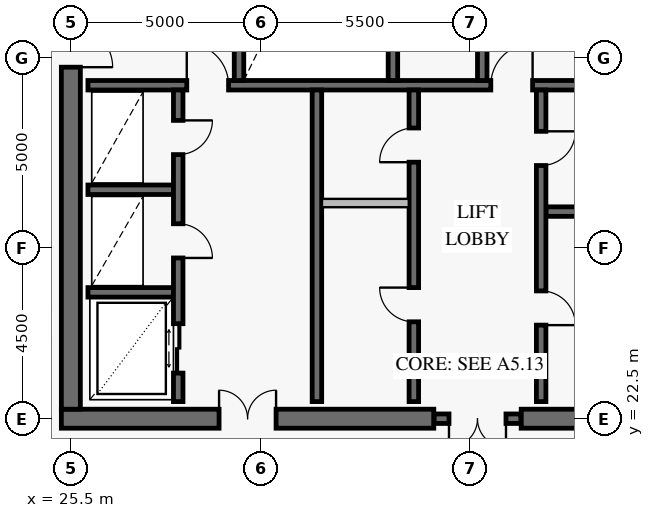
"""IFC4 building model, lengths in metres.
Left out: names, types, materials, properties, quantities, classifications, styles, units other than length and angle.
Written with IfcOpenShell. Run it as: python <this file> out.ifc"""

import sys

from ifc_helpers import new_model, si_unit, direction, frame, frame_2d, origin, place, context, subcontext, project, spatial, rectangle, extrude, element, fill, save


model = new_model("IFC4")
c1 = context("Model", 3, precision=1e-05, world=origin(), true_north=direction((0.0, 1.0)))
c2 = subcontext(c1, "Body", "Model", "MODEL_VIEW")
j1 = project(units=[si_unit("LENGTHUNIT", "METRE"), si_unit("PLANEANGLEUNIT", "RADIAN")], contexts=[c1])
p1 = place(None, origin())
s1 = spatial("IfcSite", under=j1, at=p1, CompositionType="ELEMENT")
p2 = place(p1, origin())
s2 = spatial("IfcBuilding", under=s1, at=p2, CompositionType="ELEMENT")
p3 = place(p2, frame((0.0, 0.0, 342.4)))
s3 = spatial("IfcBuildingStorey", under=s2, at=p3, CompositionType="ELEMENT", Elevation=342.4)
p4 = place(p3, frame((25.25, 22.5, 0.0), z_axis=(0.0, 0.0, 1.0), x_axis=(1.0, 0.0, 0.0)))
e1 = element("IfcWall", 1, at=p4, inside=s3, PredefinedType="SHEAR", context=c2, shape_type="SweptSolid", body=[
    extrude(rectangle(XDim=9.8, YDim=0.5, at=frame_2d((4.9, 0.0))), origin(), (0.0, 0.0, 1.0), 3.8),
])
p5 = place(p4, frame((4.15, 0.0, 0.0)))
e2 = element("IfcOpeningElement", 2, at=p5, cuts=e1, PredefinedType="OPENING", context=c2, shape_type="SweptSolid", body=[
    extrude(rectangle(XDim=1.5, YDim=2.15, at=frame_2d((0.75, 1.075))), frame((0.0, 0.262, 0.0), z_axis=(0.0, -1.0, 0.0), x_axis=(1.0, 0.0, 0.0)), (0.0, 0.0, 1.0), 0.524),
])
p6 = place(p3, frame((37.35, 22.5, 0.0), z_axis=(0.0, 0.0, 1.0), x_axis=(1.0, 0.0, 0.0)))
e3 = element("IfcWall", 3, at=p6, inside=s3, PredefinedType="SHEAR", context=c2, shape_type="SweptSolid", body=[
    extrude(rectangle(XDim=9.4, YDim=0.5, at=frame_2d((4.7, 0.0))), origin(), (0.0, 0.0, 1.0), 3.8),
])
p7 = place(p6, frame((3.95, 0.0, 0.0)))
e4 = element("IfcOpeningElement", 4, at=p7, cuts=e3, PredefinedType="OPENING", context=c2, shape_type="SweptSolid", body=[
    extrude(rectangle(XDim=1.5, YDim=2.15, at=frame_2d((0.75, 1.075))), frame((0.0, 0.262, 0.0), z_axis=(0.0, -1.0, 0.0), x_axis=(1.0, 0.0, 0.0)), (0.0, 0.0, 1.0), 0.524),
])
p8 = place(p3, frame((25.5, 22.75, 0.0), z_axis=(0.0, 0.0, 1.0), x_axis=(0.0, 1.0, 0.0)))
e5 = element("IfcWall", 5, at=p8, inside=s3, PredefinedType="SHEAR", context=c2, shape_type="SweptSolid", body=[
    extrude(rectangle(XDim=18.5, YDim=0.5, at=frame_2d((9.25, 0.0))), origin(), (0.0, 0.0, 1.0), 3.8),
])
p9 = place(p8, frame((9.0, 0.0, 0.0)))
e6 = element("IfcOpeningElement", 6, at=p9, cuts=e5, PredefinedType="OPENING", context=c2, shape_type="SweptSolid", body=[
    extrude(rectangle(XDim=1.1, YDim=2.15, at=frame_2d((0.55, 1.075))), frame((0.0, 0.262, 0.0), z_axis=(0.0, -1.0, 0.0), x_axis=(1.0, 0.0, 0.0)), (0.0, 0.0, 1.0), 0.524),
])
p10 = place(p3, frame((35.06, 22.5, 0.0), z_axis=(0.0, 0.0, 1.0), x_axis=(1.0, 0.0, 0.0)))
e7 = element("IfcWall", 7, at=p10, inside=s3, PredefinedType="SOLIDWALL", context=c2, shape_type="SweptSolid", body=[
    extrude(rectangle(XDim=2.28, YDim=0.25, at=frame_2d((1.14, 0.0))), origin(), (0.0, 0.0, 1.0), 3.8),
])
p11 = place(p10, frame((0.39, 0.0, 0.0)))
e8 = element("IfcOpeningElement", 8, at=p11, cuts=e7, PredefinedType="OPENING", context=c2, shape_type="SweptSolid", body=[
    extrude(rectangle(XDim=1.5, YDim=2.15, at=frame_2d((0.75, 1.075))), frame((0.0, 0.137, 0.0), z_axis=(0.0, -1.0, 0.0), x_axis=(1.0, 0.0, 0.0)), (0.0, 0.0, 1.0), 0.274),
])
p12 = place(p3, frame((25.95, 31.275, 0.0), z_axis=(0.0, 0.0, 1.0), x_axis=(1.0, 0.0, 0.0)))
e9 = element("IfcWall", 9, at=p12, inside=s3, PredefinedType="SOLIDWALL", context=c2, shape_type="SweptSolid", body=[
    extrude(rectangle(XDim=20.1, YDim=0.25, at=frame_2d((10.05, 0.0))), origin(), (0.0, 0.0, 1.0), 3.8),
])
p13 = place(p12, frame((2.6, 0.0, 0.0)))
e10 = element("IfcOpeningElement", 10, at=p13, cuts=e9, PredefinedType="OPENING", context=c2, shape_type="SweptSolid", body=[
    extrude(rectangle(XDim=1.1, YDim=2.15, at=frame_2d((0.55, 1.075))), frame((0.0, 0.137, 0.0), z_axis=(0.0, -1.0, 0.0), x_axis=(1.0, 0.0, 0.0)), (0.0, 0.0, 1.0), 0.274),
])
p14 = place(p12, frame((10.6, 0.0, 0.0)))
e11 = element("IfcOpeningElement", 11, at=p14, cuts=e9, PredefinedType="OPENING", context=c2, shape_type="SweptSolid", body=[
    extrude(rectangle(XDim=1.1, YDim=2.15, at=frame_2d((0.55, 1.075))), frame((0.0, 0.137, 0.0), z_axis=(0.0, -1.0, 0.0), x_axis=(1.0, 0.0, 0.0)), (0.0, 0.0, 1.0), 0.274),
])
p15 = place(p12, frame((16.35, 0.0, 0.0)))
e12 = element("IfcOpeningElement", 12, at=p15, cuts=e9, PredefinedType="OPENING", context=c2, shape_type="SweptSolid", body=[
    extrude(rectangle(XDim=1.1, YDim=2.15, at=frame_2d((0.55, 1.075))), frame((0.0, 0.137, 0.0), z_axis=(0.0, -1.0, 0.0), x_axis=(1.0, 0.0, 0.0)), (0.0, 0.0, 1.0), 0.274),
])
for number, where, z_axis, x_axis in (
    (13, (29.925, 31.4, 0.0), (0.0, 0.0, 1.0), (0.0, 1.0, 0.0)),
    (14, (33.975, 31.4, 0.0), (0.0, 0.0, 1.0), (0.0, 1.0, 0.0)),
):
    element("IfcWall", number, at=place(p3, frame(where, z_axis=z_axis, x_axis=x_axis)), inside=s3, PredefinedType="SOLIDWALL", context=c2, shape_type="SweptSolid", body=[
        extrude(rectangle(XDim=9.7, YDim=0.25, at=frame_2d((4.85, 0.0))), origin(), (0.0, 0.0, 1.0), 3.8),
    ])
p16 = place(p3, frame((36.325, 31.4, 0.0), z_axis=(0.0, 0.0, 1.0), x_axis=(0.0, 1.0, 0.0)))
e15 = element("IfcWall", 15, at=p16, inside=s3, PredefinedType="SOLIDWALL", context=c2, shape_type="SweptSolid", body=[
    extrude(rectangle(XDim=9.65, YDim=0.25, at=frame_2d((4.825, 0.0))), origin(), (0.0, 0.0, 1.0), 3.8),
])
p17 = place(p16, frame((0.84, 0.0, 0.0)))
e16 = element("IfcOpeningElement", 16, at=p17, cuts=e15, PredefinedType="OPENING", context=c2, shape_type="SweptSolid", body=[
    extrude(rectangle(XDim=0.9, YDim=2.1, at=frame_2d((0.45, 1.05))), frame((0.0, 0.137, 0.0), z_axis=(0.0, -1.0, 0.0), x_axis=(1.0, 0.0, 0.0)), (0.0, 0.0, 1.0), 0.274),
])
p18 = place(p16, frame((4.1, 0.0, 0.0)))
e17 = element("IfcOpeningElement", 17, at=p18, cuts=e15, PredefinedType="OPENING", context=c2, shape_type="SweptSolid", body=[
    extrude(rectangle(XDim=0.9, YDim=2.1, at=frame_2d((0.45, 1.05))), frame((0.0, 0.137, 0.0), z_axis=(0.0, -1.0, 0.0), x_axis=(1.0, 0.0, 0.0)), (0.0, 0.0, 1.0), 0.274),
])
p19 = place(p16, frame((7.61, 0.0, 0.0)))
e18 = element("IfcOpeningElement", 18, at=p19, cuts=e15, PredefinedType="OPENING", context=c2, shape_type="SweptSolid", body=[
    extrude(rectangle(XDim=0.9, YDim=2.1, at=frame_2d((0.45, 1.05))), frame((0.0, 0.137, 0.0), z_axis=(0.0, -1.0, 0.0), x_axis=(1.0, 0.0, 0.0)), (0.0, 0.0, 1.0), 0.274),
])
for number, where, z_axis, x_axis in (
    (19, (25.95, 25.825, 0.0), (0.0, 0.0, 1.0), (1.0, 0.0, 0.0)),
    (20, (25.95, 28.525, 0.0), (0.0, 0.0, 1.0), (1.0, 0.0, 0.0)),
):
    element("IfcWall", number, at=place(p3, frame(where, z_axis=z_axis, x_axis=x_axis)), inside=s3, PredefinedType="SOLIDWALL", context=c2, shape_type="SweptSolid", body=[
        extrude(rectangle(XDim=2.25, YDim=0.25, at=frame_2d((1.125, 0.0))), origin(), (0.0, 0.0, 1.0), 3.8),
    ])
p20 = place(p3, frame((28.325, 22.95, 0.0), z_axis=(0.0, 0.0, 1.0), x_axis=(0.0, 1.0, 0.0)))
e21 = element("IfcWall", 21, at=p20, inside=s3, PredefinedType="SOLIDWALL", context=c2, shape_type="SweptSolid", body=[
    extrude(rectangle(XDim=8.2, YDim=0.25, at=frame_2d((4.1, 0.0))), origin(), (0.0, 0.0, 1.0), 3.8),
])
p21 = place(p20, frame((0.75, 0.0, 0.0)))
e22 = element("IfcOpeningElement", 22, at=p21, cuts=e21, PredefinedType="OPENING", context=c2, shape_type="SweptSolid", body=[
    extrude(rectangle(XDim=1.3, YDim=2.3, at=frame_2d((0.65, 1.15))), frame((0.0, 0.137, 0.0), z_axis=(0.0, -1.0, 0.0), x_axis=(1.0, 0.0, 0.0)), (0.0, 0.0, 1.0), 0.274),
])
p22 = place(p20, frame((3.78, 0.0, 0.0)))
e23 = element("IfcOpeningElement", 23, at=p22, cuts=e21, PredefinedType="OPENING", context=c2, shape_type="SweptSolid", body=[
    extrude(rectangle(XDim=0.9, YDim=2.1, at=frame_2d((0.45, 1.05))), frame((0.0, 0.137, 0.0), z_axis=(0.0, -1.0, 0.0), x_axis=(1.0, 0.0, 0.0)), (0.0, 0.0, 1.0), 0.274),
])
p23 = place(p20, frame((6.5, 0.0, 0.0)))
e24 = element("IfcOpeningElement", 24, at=p23, cuts=e21, PredefinedType="OPENING", context=c2, shape_type="SweptSolid", body=[
    extrude(rectangle(XDim=0.9, YDim=2.1, at=frame_2d((0.45, 1.05))), frame((0.0, 0.137, 0.0), z_axis=(0.0, -1.0, 0.0), x_axis=(1.0, 0.0, 0.0)), (0.0, 0.0, 1.0), 0.274),
])
p24 = place(p3, frame((31.975, 22.95, 0.0), z_axis=(0.0, 0.0, 1.0), x_axis=(0.0, 1.0, 0.0)))
e25 = element("IfcWall", 25, at=p24, inside=s3, PredefinedType="SOLIDWALL", context=c2, shape_type="SweptSolid", body=[
    extrude(rectangle(XDim=8.2, YDim=0.25, at=frame_2d((4.1, 0.0))), origin(), (0.0, 0.0, 1.0), 3.8),
])
p25 = place(p3, frame((34.525, 22.95, 0.0), z_axis=(0.0, 0.0, 1.0), x_axis=(0.0, 1.0, 0.0)))
e26 = element("IfcWall", 26, at=p25, inside=s3, PredefinedType="SOLIDWALL", context=c2, shape_type="SweptSolid", body=[
    extrude(rectangle(XDim=8.2, YDim=0.25, at=frame_2d((4.1, 0.0))), origin(), (0.0, 0.0, 1.0), 3.8),
])
p26 = place(p25, frame((2.1, 0.0, 0.0)))
e27 = element("IfcOpeningElement", 27, at=p26, cuts=e26, PredefinedType="OPENING", context=c2, shape_type="SweptSolid", body=[
    extrude(rectangle(XDim=0.9, YDim=2.1, at=frame_2d((0.45, 1.05))), frame((0.0, 0.137, 0.0), z_axis=(0.0, -1.0, 0.0), x_axis=(1.0, 0.0, 0.0)), (0.0, 0.0, 1.0), 0.274),
])
p27 = place(p25, frame((6.3, 0.0, 0.0)))
e28 = element("IfcOpeningElement", 28, at=p27, cuts=e26, PredefinedType="OPENING", context=c2, shape_type="SweptSolid", body=[
    extrude(rectangle(XDim=0.9, YDim=2.1, at=frame_2d((0.45, 1.05))), frame((0.0, 0.137, 0.0), z_axis=(0.0, -1.0, 0.0), x_axis=(1.0, 0.0, 0.0)), (0.0, 0.0, 1.0), 0.274),
])
p28 = place(p3, frame((38.0, 27.95, 0.0), z_axis=(0.0, 0.0, 1.0), x_axis=(1.0, 0.0, 0.0)))
e29 = element("IfcWall", 29, at=p28, inside=s3, PredefinedType="SOLIDWALL", context=c2, shape_type="SweptSolid", body=[
    extrude(rectangle(XDim=2.3, YDim=0.25, at=frame_2d((1.15, 0.0))), origin(), (0.0, 0.0, 1.0), 3.8),
])
p29 = place(p3, frame((37.875, 22.95, 0.0), z_axis=(0.0, 0.0, 1.0), x_axis=(0.0, 1.0, 0.0)))
e30 = element("IfcWall", 30, at=p29, inside=s3, PredefinedType="SOLIDWALL", context=c2, shape_type="SweptSolid", body=[
    extrude(rectangle(XDim=8.2, YDim=0.25, at=frame_2d((4.1, 0.0))), origin(), (0.0, 0.0, 1.0), 3.8),
])
p30 = place(p29, frame((2.012, 0.0, 0.0)))
e31 = element("IfcOpeningElement", 31, at=p30, cuts=e30, PredefinedType="OPENING", context=c2, shape_type="SweptSolid", body=[
    extrude(rectangle(XDim=0.9, YDim=2.1, at=frame_2d((0.45, 1.05))), frame((0.0, 0.137, 0.0), z_axis=(0.0, -1.0, 0.0), x_axis=(1.0, 0.0, 0.0)), (0.0, 0.0, 1.0), 0.274),
])
p31 = place(p29, frame((6.212, 0.0, 0.0)))
e32 = element("IfcOpeningElement", 32, at=p31, cuts=e30, PredefinedType="OPENING", context=c2, shape_type="SweptSolid", body=[
    extrude(rectangle(XDim=0.9, YDim=2.1, at=frame_2d((0.45, 1.05))), frame((0.0, 0.137, 0.0), z_axis=(0.0, -1.0, 0.0), x_axis=(1.0, 0.0, 0.0)), (0.0, 0.0, 1.0), 0.274),
])
p32 = place(p3, frame((32.108, 28.175, 0.0), z_axis=(0.0, 0.0, 1.0), x_axis=(1.0, 0.0, 0.0)))
e33 = element("IfcWall", 33, at=p32, inside=s3, PredefinedType="PARTITIONING", context=c2, shape_type="SweptSolid", body=[
    extrude(rectangle(XDim=2.284, YDim=0.22, at=frame_2d((1.142, 0.0))), origin(), (0.0, 0.0, 1.0), 3.55),
])
p33 = place(p9, frame((1.1, 0.0, 0.0), z_axis=(0.0, 0.0, 1.0), x_axis=(-1.0, 0.0, 0.0)))
e34 = element("IfcDoor", 34, at=p33, inside=s3, OperationType="SINGLE_SWING_RIGHT", PredefinedType="USERDEFINED", context=c2, shape_type="SweptSolid", body=[
    extrude(rectangle(XDim=1.1, YDim=2.15, at=frame_2d((0.55, 1.075))), frame((0.0, 0.025, 0.0), z_axis=(0.0, -1.0, 0.0), x_axis=(1.0, 0.0, 0.0)), (0.0, 0.0, 1.0), 0.05),
])
fill(e6, e34)
p34 = place(p5, origin())
e35 = element("IfcDoor", 35, at=p34, inside=s3, OperationType="DOUBLE_DOOR_SINGLE_SWING", PredefinedType="DOOR", context=c2, shape_type="SweptSolid", body=[
    extrude(rectangle(XDim=1.5, YDim=2.15, at=frame_2d((0.75, 1.075))), frame((0.0, 0.025, 0.0), z_axis=(0.0, -1.0, 0.0), x_axis=(1.0, 0.0, 0.0)), (0.0, 0.0, 1.0), 0.05),
])
fill(e2, e35)
p35 = place(p11, frame((1.5, 0.0, 0.0), z_axis=(0.0, 0.0, 1.0), x_axis=(-1.0, 0.0, 0.0)))
e36 = element("IfcDoor", 36, at=p35, inside=s3, OperationType="DOUBLE_DOOR_SINGLE_SWING", PredefinedType="DOOR", context=c2, shape_type="SweptSolid", body=[
    extrude(rectangle(XDim=1.5, YDim=2.15, at=frame_2d((0.75, 1.075))), frame((0.0, 0.025, 0.0), z_axis=(0.0, -1.0, 0.0), x_axis=(1.0, 0.0, 0.0)), (0.0, 0.0, 1.0), 0.05),
])
fill(e8, e36)
p36 = place(p13, origin())
e37 = element("IfcDoor", 37, at=p36, inside=s3, OperationType="SINGLE_SWING_LEFT", PredefinedType="USERDEFINED", context=c2, shape_type="SweptSolid", body=[
    extrude(rectangle(XDim=1.1, YDim=2.15, at=frame_2d((0.55, 1.075))), frame((0.0, 0.025, 0.0), z_axis=(0.0, -1.0, 0.0), x_axis=(1.0, 0.0, 0.0)), (0.0, 0.0, 1.0), 0.05),
])
fill(e10, e37)
p37 = place(p14, origin())
e38 = element("IfcDoor", 38, at=p37, inside=s3, OperationType="SINGLE_SWING_RIGHT", PredefinedType="USERDEFINED", context=c2, shape_type="SweptSolid", body=[
    extrude(rectangle(XDim=1.1, YDim=2.15, at=frame_2d((0.55, 1.075))), frame((0.0, 0.025, 0.0), z_axis=(0.0, -1.0, 0.0), x_axis=(1.0, 0.0, 0.0)), (0.0, 0.0, 1.0), 0.05),
])
fill(e11, e38)
p38 = place(p21, frame((1.3, 0.0, 0.0), z_axis=(0.0, 0.0, 1.0), x_axis=(-1.0, 0.0, 0.0)))
e39 = element("IfcDoor", 39, at=p38, inside=s3, OperationType="DOUBLE_DOOR_SLIDING", PredefinedType="DOOR", context=c2, shape_type="SweptSolid", body=[
    extrude(rectangle(XDim=1.3, YDim=2.3, at=frame_2d((0.65, 1.15))), frame((0.0, 0.025, 0.0), z_axis=(0.0, -1.0, 0.0), x_axis=(1.0, 0.0, 0.0)), (0.0, 0.0, 1.0), 0.05),
])
fill(e22, e39)
p39 = place(p22, frame((0.9, 0.0, 0.0), z_axis=(0.0, 0.0, 1.0), x_axis=(-1.0, 0.0, 0.0)))
e40 = element("IfcDoor", 40, at=p39, inside=s3, OperationType="SINGLE_SWING_RIGHT", PredefinedType="DOOR", context=c2, shape_type="SweptSolid", body=[
    extrude(rectangle(XDim=0.9, YDim=2.1, at=frame_2d((0.45, 1.05))), frame((0.0, 0.025, 0.0), z_axis=(0.0, -1.0, 0.0), x_axis=(1.0, 0.0, 0.0)), (0.0, 0.0, 1.0), 0.05),
])
fill(e23, e40)
p40 = place(p23, frame((0.9, 0.0, 0.0), z_axis=(0.0, 0.0, 1.0), x_axis=(-1.0, 0.0, 0.0)))
e41 = element("IfcDoor", 41, at=p40, inside=s3, OperationType="SINGLE_SWING_LEFT", PredefinedType="DOOR", context=c2, shape_type="SweptSolid", body=[
    extrude(rectangle(XDim=0.9, YDim=2.1, at=frame_2d((0.45, 1.05))), frame((0.0, 0.025, 0.0), z_axis=(0.0, -1.0, 0.0), x_axis=(1.0, 0.0, 0.0)), (0.0, 0.0, 1.0), 0.05),
])
fill(e24, e41)
p41 = place(p26, origin())
e42 = element("IfcDoor", 42, at=p41, inside=s3, OperationType="SINGLE_SWING_RIGHT", PredefinedType="DOOR", context=c2, shape_type="SweptSolid", body=[
    extrude(rectangle(XDim=0.9, YDim=2.1, at=frame_2d((0.45, 1.05))), frame((0.0, 0.025, 0.0), z_axis=(0.0, -1.0, 0.0), x_axis=(1.0, 0.0, 0.0)), (0.0, 0.0, 1.0), 0.05),
])
fill(e27, e42)
p42 = place(p27, origin())
e43 = element("IfcDoor", 43, at=p42, inside=s3, OperationType="SINGLE_SWING_LEFT", PredefinedType="DOOR", context=c2, shape_type="SweptSolid", body=[
    extrude(rectangle(XDim=0.9, YDim=2.1, at=frame_2d((0.45, 1.05))), frame((0.0, 0.025, 0.0), z_axis=(0.0, -1.0, 0.0), x_axis=(1.0, 0.0, 0.0)), (0.0, 0.0, 1.0), 0.05),
])
fill(e28, e43)
p43 = place(p30, frame((0.9, 0.0, 0.0), z_axis=(0.0, 0.0, 1.0), x_axis=(-1.0, 0.0, 0.0)))
e44 = element("IfcDoor", 44, at=p43, inside=s3, OperationType="SINGLE_SWING_RIGHT", PredefinedType="DOOR", context=c2, shape_type="SweptSolid", body=[
    extrude(rectangle(XDim=0.9, YDim=2.1, at=frame_2d((0.45, 1.05))), frame((0.0, 0.025, 0.0), z_axis=(0.0, -1.0, 0.0), x_axis=(1.0, 0.0, 0.0)), (0.0, 0.0, 1.0), 0.05),
])
fill(e31, e44)
p44 = place(p31, frame((0.9, 0.0, 0.0), z_axis=(0.0, 0.0, 1.0), x_axis=(-1.0, 0.0, 0.0)))
e45 = element("IfcDoor", 45, at=p44, inside=s3, OperationType="SINGLE_SWING_LEFT", PredefinedType="DOOR", context=c2, shape_type="SweptSolid", body=[
    extrude(rectangle(XDim=0.9, YDim=2.1, at=frame_2d((0.45, 1.05))), frame((0.0, 0.025, 0.0), z_axis=(0.0, -1.0, 0.0), x_axis=(1.0, 0.0, 0.0)), (0.0, 0.0, 1.0), 0.05),
])
fill(e32, e45)
save(model, sys.argv[1])
